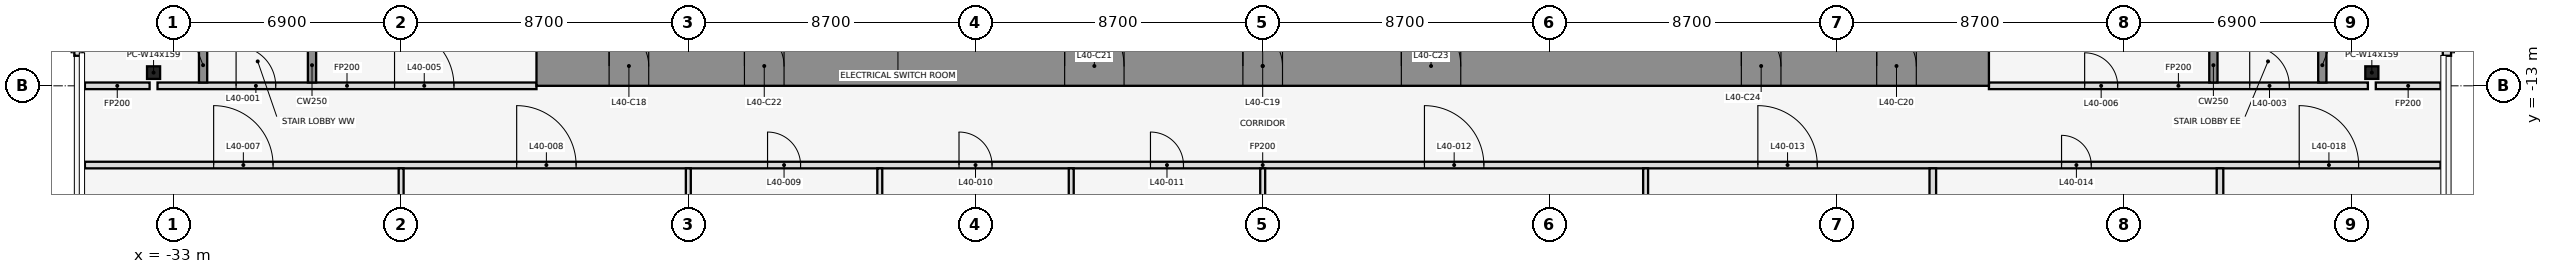
"""IFC4 building model, lengths in metres.
Left out: names, types, materials, properties, quantities, classifications, styles, units other than length and angle.
Written with IfcOpenShell. Run it as: python <this file> out.ifc"""

import sys

from ifc_helpers import new_model, si_unit, direction, frame, frame_2d, origin, origin_2d, place, context, subcontext, project, spatial, rectangle, i_section, extrude, element, fill, save


model = new_model("IFC4")
c1 = context("Model", 3, precision=1e-05, world=origin(), true_north=direction((0.0, 1.0)))
c2 = subcontext(c1, "Body", "Model", "MODEL_VIEW")
j1 = project(units=[si_unit("LENGTHUNIT", "METRE"), si_unit("PLANEANGLEUNIT", "RADIAN")], contexts=[c1])
p1 = place(None, origin())
s1 = spatial("IfcSite", under=j1, at=p1, CompositionType="ELEMENT")
p2 = place(p1, origin())
s2 = spatial("IfcBuilding", under=s1, at=p2, CompositionType="ELEMENT")
p3 = place(p2, frame((0.0, 0.0, 181.4)))
s3 = spatial("IfcBuildingStorey", under=s2, at=p3, CompositionType="ELEMENT", Elevation=181.4)
for number, where, z_axis, x_axis in (
    (1, (-33.6, -12.6, 0.0), (0.0, 0.0, 1.0), (1.0, 0.0, 0.0)),
    (2, (33.6, -12.6, 0.0), (0.0, 0.0, 1.0), (1.0, 0.0, 0.0)),
):
    element("IfcColumn", number, at=place(p3, frame(where, z_axis=z_axis, x_axis=x_axis)), inside=s3, PredefinedType="COLUMN", context=c2, shape_type="SweptSolid", body=[
        extrude(i_section(OverallWidth=0.396, OverallDepth=0.381, WebThickness=0.019, FlangeThickness=0.03, at=origin_2d()), origin(), (0.0, 0.0, 1.0), 4.1),
    ])
for number, where, z_axis, x_axis in (
    (3, (-35.875, -3.0, 0.0), (0.0, 0.0, 1.0), (0.0, -1.0, 0.0)),
    (4, (35.875, -12.09, 0.0), (0.0, 0.0, 1.0), (0.0, 1.0, 0.0)),
):
    element("IfcWall", number, at=place(p3, frame(where, z_axis=z_axis, x_axis=x_axis)), inside=s3, PredefinedType="STANDARD", context=c2, shape_type="SweptSolid", body=[
        extrude(rectangle(XDim=9.09, YDim=0.25, at=frame_2d((4.545, 0.0))), origin(), (0.0, 0.0, 1.0), 3.9),
    ])
p4 = place(p3, frame((-35.68, -15.4, 0.0), z_axis=(0.0, 0.0, 1.0), x_axis=(1.0, 0.0, 0.0)))
e5 = element("IfcWall", 5, at=p4, inside=s3, PredefinedType="PARTITIONING", context=c2, shape_type="SweptSolid", body=[
    extrude(rectangle(XDim=71.36, YDim=0.2, at=frame_2d((35.68, 0.0))), origin(), (0.0, 0.0, 1.0), 2.79),
])
p5 = place(p4, frame((3.9, 0.0, 0.0)))
e6 = element("IfcOpeningElement", 6, at=p5, cuts=e5, PredefinedType="OPENING", context=c2, shape_type="SweptSolid", body=[
    extrude(rectangle(XDim=1.8, YDim=2.1, at=frame_2d((0.9, 1.05))), frame((0.0, 0.112, 0.0), z_axis=(0.0, -1.0, 0.0), x_axis=(1.0, 0.0, 0.0)), (0.0, 0.0, 1.0), 0.224),
])
p6 = place(p4, frame((13.08, 0.0, 0.0)))
e7 = element("IfcOpeningElement", 7, at=p6, cuts=e5, PredefinedType="OPENING", context=c2, shape_type="SweptSolid", body=[
    extrude(rectangle(XDim=1.8, YDim=2.1, at=frame_2d((0.9, 1.05))), frame((0.0, 0.112, 0.0), z_axis=(0.0, -1.0, 0.0), x_axis=(1.0, 0.0, 0.0)), (0.0, 0.0, 1.0), 0.224),
])
p7 = place(p4, frame((20.68, 0.0, 0.0)))
e8 = element("IfcOpeningElement", 8, at=p7, cuts=e5, PredefinedType="OPENING", context=c2, shape_type="SweptSolid", body=[
    extrude(rectangle(XDim=1.0, YDim=2.1, at=frame_2d((0.5, 1.05))), frame((0.0, 0.112, 0.0), z_axis=(0.0, -1.0, 0.0), x_axis=(1.0, 0.0, 0.0)), (0.0, 0.0, 1.0), 0.224),
])
p8 = place(p4, frame((26.48, 0.0, 0.0)))
e9 = element("IfcOpeningElement", 9, at=p8, cuts=e5, PredefinedType="OPENING", context=c2, shape_type="SweptSolid", body=[
    extrude(rectangle(XDim=1.0, YDim=2.1, at=frame_2d((0.5, 1.05))), frame((0.0, 0.112, 0.0), z_axis=(0.0, -1.0, 0.0), x_axis=(1.0, 0.0, 0.0)), (0.0, 0.0, 1.0), 0.224),
])
p9 = place(p4, frame((32.28, 0.0, 0.0)))
e10 = element("IfcOpeningElement", 10, at=p9, cuts=e5, PredefinedType="OPENING", context=c2, shape_type="SweptSolid", body=[
    extrude(rectangle(XDim=1.0, YDim=2.1, at=frame_2d((0.5, 1.05))), frame((0.0, 0.112, 0.0), z_axis=(0.0, -1.0, 0.0), x_axis=(1.0, 0.0, 0.0)), (0.0, 0.0, 1.0), 0.224),
])
p10 = place(p4, frame((40.58, 0.0, 0.0)))
e11 = element("IfcOpeningElement", 11, at=p10, cuts=e5, PredefinedType="OPENING", context=c2, shape_type="SweptSolid", body=[
    extrude(rectangle(XDim=1.8, YDim=2.1, at=frame_2d((0.9, 1.05))), frame((0.0, 0.112, 0.0), z_axis=(0.0, -1.0, 0.0), x_axis=(1.0, 0.0, 0.0)), (0.0, 0.0, 1.0), 0.224),
])
p11 = place(p4, frame((50.68, 0.0, 0.0)))
e12 = element("IfcOpeningElement", 12, at=p11, cuts=e5, PredefinedType="OPENING", context=c2, shape_type="SweptSolid", body=[
    extrude(rectangle(XDim=1.8, YDim=2.1, at=frame_2d((0.9, 1.05))), frame((0.0, 0.112, 0.0), z_axis=(0.0, -1.0, 0.0), x_axis=(1.0, 0.0, 0.0)), (0.0, 0.0, 1.0), 0.224),
])
p12 = place(p4, frame((59.88, 0.0, 0.0)))
e13 = element("IfcOpeningElement", 13, at=p12, cuts=e5, PredefinedType="OPENING", context=c2, shape_type="SweptSolid", body=[
    extrude(rectangle(XDim=0.9, YDim=2.1, at=frame_2d((0.45, 1.05))), frame((0.0, 0.112, 0.0), z_axis=(0.0, -1.0, 0.0), x_axis=(1.0, 0.0, 0.0)), (0.0, 0.0, 1.0), 0.224),
])
p13 = place(p4, frame((67.08, 0.0, 0.0)))
e14 = element("IfcOpeningElement", 14, at=p13, cuts=e5, PredefinedType="OPENING", context=c2, shape_type="SweptSolid", body=[
    extrude(rectangle(XDim=1.8, YDim=2.1, at=frame_2d((0.9, 1.05))), frame((0.0, 0.112, 0.0), z_axis=(0.0, -1.0, 0.0), x_axis=(1.0, 0.0, 0.0)), (0.0, 0.0, 1.0), 0.224),
])
p14 = place(p3, frame((-35.68, -13.0, 0.0), z_axis=(0.0, 0.0, 1.0), x_axis=(1.0, 0.0, 0.0)))
e15 = element("IfcWall", 15, at=p14, inside=s3, PredefinedType="PARTITIONING", context=c2, shape_type="SweptSolid", body=[
    extrude(rectangle(XDim=1.96, YDim=0.2, at=frame_2d((0.98, 0.0))), origin(), (0.0, 0.0, 1.0), 2.79),
])
p15 = place(p3, frame((-33.48, -13.0, 0.0), z_axis=(0.0, 0.0, 1.0), x_axis=(1.0, 0.0, 0.0)))
e16 = element("IfcWall", 16, at=p15, inside=s3, PredefinedType="PARTITIONING", context=c2, shape_type="SweptSolid", body=[
    extrude(rectangle(XDim=11.48, YDim=0.2, at=frame_2d((5.74, 0.0))), origin(), (0.0, 0.0, 1.0), 2.79),
])
p16 = place(p15, frame((2.38, 0.0, 0.0)))
e17 = element("IfcOpeningElement", 17, at=p16, cuts=e16, PredefinedType="OPENING", context=c2, shape_type="SweptSolid", body=[
    extrude(rectangle(XDim=1.2, YDim=2.1, at=frame_2d((0.6, 1.05))), frame((0.0, 0.112, 0.0), z_axis=(0.0, -1.0, 0.0), x_axis=(1.0, 0.0, 0.0)), (0.0, 0.0, 1.0), 0.224),
])
p17 = place(p15, frame((7.18, 0.0, 0.0)))
e18 = element("IfcOpeningElement", 18, at=p17, cuts=e16, PredefinedType="OPENING", context=c2, shape_type="SweptSolid", body=[
    extrude(rectangle(XDim=1.8, YDim=2.1, at=frame_2d((0.9, 1.05))), frame((0.0, 0.112, 0.0), z_axis=(0.0, -1.0, 0.0), x_axis=(1.0, 0.0, 0.0)), (0.0, 0.0, 1.0), 0.224),
])
p18 = place(p3, frame((22.0, -13.0, 0.0), z_axis=(0.0, 0.0, 1.0), x_axis=(1.0, 0.0, 0.0)))
e19 = element("IfcWall", 19, at=p18, inside=s3, PredefinedType="PARTITIONING", context=c2, shape_type="SweptSolid", body=[
    extrude(rectangle(XDim=11.48, YDim=0.2, at=frame_2d((5.74, 0.0))), origin(), (0.0, 0.0, 1.0), 2.79),
])
p19 = place(p18, frame((7.9, 0.0, 0.0)))
e20 = element("IfcOpeningElement", 20, at=p19, cuts=e19, PredefinedType="OPENING", context=c2, shape_type="SweptSolid", body=[
    extrude(rectangle(XDim=1.2, YDim=2.1, at=frame_2d((0.6, 1.05))), frame((0.0, 0.112, 0.0), z_axis=(0.0, -1.0, 0.0), x_axis=(1.0, 0.0, 0.0)), (0.0, 0.0, 1.0), 0.224),
])
p20 = place(p18, frame((2.9, 0.0, 0.0)))
e21 = element("IfcOpeningElement", 21, at=p20, cuts=e19, PredefinedType="OPENING", context=c2, shape_type="SweptSolid", body=[
    extrude(rectangle(XDim=1.0, YDim=2.1, at=frame_2d((0.5, 1.05))), frame((0.0, 0.112, 0.0), z_axis=(0.0, -1.0, 0.0), x_axis=(1.0, 0.0, 0.0)), (0.0, 0.0, 1.0), 0.224),
])
p21 = place(p3, frame((33.72, -13.0, 0.0), z_axis=(0.0, 0.0, 1.0), x_axis=(1.0, 0.0, 0.0)))
e22 = element("IfcWall", 22, at=p21, inside=s3, PredefinedType="PARTITIONING", context=c2, shape_type="SweptSolid", body=[
    extrude(rectangle(XDim=1.96, YDim=0.2, at=frame_2d((0.98, 0.0))), origin(), (0.0, 0.0, 1.0), 2.79),
])
for number, where, z_axis, x_axis in (
    (23, (-32.1, -12.9, 0.0), (0.0, 0.0, 1.0), (0.0, 1.0, 0.0)),
    (24, (-28.8, -12.9, 0.0), (0.0, 0.0, 1.0), (0.0, 1.0, 0.0)),
):
    element("IfcWall", number, at=place(p3, frame(where, z_axis=z_axis, x_axis=x_axis)), inside=s3, PredefinedType="SHEAR", context=c2, shape_type="SweptSolid", body=[
        extrude(rectangle(XDim=1.05, YDim=0.25, at=frame_2d((0.525, 0.0))), origin(), (0.0, 0.0, 1.0), 4.1),
    ])
p22 = place(p3, frame((-26.1, -33.49, 0.0), z_axis=(0.0, 0.0, 1.0), x_axis=(0.0, 1.0, 0.0)))
e25 = element("IfcWall", 25, at=p22, inside=s3, PredefinedType="PARTITIONING", context=c2, shape_type="SweptSolid", body=[
    extrude(rectangle(XDim=17.99, YDim=0.15, at=frame_2d((8.995, 0.0))), origin(), (0.0, 0.0, 1.0), 2.79),
])
p23 = place(p3, frame((-17.4, -30.816, 0.0), z_axis=(0.0, 0.0, 1.0), x_axis=(0.0, 1.0, 0.0)))
e26 = element("IfcWall", 26, at=p23, inside=s3, PredefinedType="PARTITIONING", context=c2, shape_type="SweptSolid", body=[
    extrude(rectangle(XDim=15.316, YDim=0.15, at=frame_2d((7.658, 0.0))), origin(), (0.0, 0.0, 1.0), 2.79),
])
p24 = place(p3, frame((-11.6, -33.391, 0.0), z_axis=(0.0, 0.0, 1.0), x_axis=(0.0, 1.0, 0.0)))
e27 = element("IfcWall", 27, at=p24, inside=s3, PredefinedType="PARTITIONING", context=c2, shape_type="SweptSolid", body=[
    extrude(rectangle(XDim=17.891, YDim=0.15, at=frame_2d((8.946, 0.0))), origin(), (0.0, 0.0, 1.0), 2.79),
])
p25 = place(p3, frame((-5.8, -36.21, 0.0), z_axis=(0.0, 0.0, 1.0), x_axis=(0.0, 1.0, 0.0)))
e28 = element("IfcWall", 28, at=p25, inside=s3, PredefinedType="PARTITIONING", context=c2, shape_type="SweptSolid", body=[
    extrude(rectangle(XDim=20.71, YDim=0.15, at=frame_2d((10.355, 0.0))), origin(), (0.0, 0.0, 1.0), 2.79),
])
p26 = place(p3, frame((0.0, -33.45, 0.0), z_axis=(0.0, 0.0, 1.0), x_axis=(0.0, 1.0, 0.0)))
e29 = element("IfcWall", 29, at=p26, inside=s3, PredefinedType="PARTITIONING", context=c2, shape_type="SweptSolid", body=[
    extrude(rectangle(XDim=17.95, YDim=0.15, at=frame_2d((8.975, 0.0))), origin(), (0.0, 0.0, 1.0), 2.79),
])
p27 = place(p3, frame((11.6, -33.391, 0.0), z_axis=(0.0, 0.0, 1.0), x_axis=(0.0, 1.0, 0.0)))
e30 = element("IfcWall", 30, at=p27, inside=s3, PredefinedType="PARTITIONING", context=c2, shape_type="SweptSolid", body=[
    extrude(rectangle(XDim=17.891, YDim=0.15, at=frame_2d((8.946, 0.0))), origin(), (0.0, 0.0, 1.0), 2.79),
])
p28 = place(p3, frame((20.3, -33.49, 0.0), z_axis=(0.0, 0.0, 1.0), x_axis=(0.0, 1.0, 0.0)))
e31 = element("IfcWall", 31, at=p28, inside=s3, PredefinedType="PARTITIONING", context=c2, shape_type="SweptSolid", body=[
    extrude(rectangle(XDim=17.99, YDim=0.2, at=frame_2d((8.995, 0.0))), origin(), (0.0, 0.0, 1.0), 2.79),
])
p29 = place(p3, frame((28.8, -12.9, 0.0), z_axis=(0.0, 0.0, 1.0), x_axis=(0.0, 1.0, 0.0)))
e32 = element("IfcWall", 32, at=p29, inside=s3, PredefinedType="SHEAR", context=c2, shape_type="SweptSolid", body=[
    extrude(rectangle(XDim=1.05, YDim=0.25, at=frame_2d((0.525, 0.0))), origin(), (0.0, 0.0, 1.0), 4.1),
])
p30 = place(p3, frame((29.0, -21.725, 0.0), z_axis=(0.0, 0.0, 1.0), x_axis=(0.0, 1.0, 0.0)))
e33 = element("IfcWall", 33, at=p30, inside=s3, PredefinedType="PARTITIONING", context=c2, shape_type="SweptSolid", body=[
    extrude(rectangle(XDim=6.225, YDim=0.2, at=frame_2d((3.113, 0.0))), origin(), (0.0, 0.0, 1.0), 2.79),
])
p31 = place(p3, frame((32.1, -12.9, 0.0), z_axis=(0.0, 0.0, 1.0), x_axis=(0.0, 1.0, 0.0)))
e34 = element("IfcWall", 34, at=p31, inside=s3, PredefinedType="SHEAR", context=c2, shape_type="SweptSolid", body=[
    extrude(rectangle(XDim=1.05, YDim=0.25, at=frame_2d((0.525, 0.0))), origin(), (0.0, 0.0, 1.0), 4.1),
])
p32 = place(p3, frame((-22.0, -12.4, 0.0), z_axis=(0.0, 0.0, 1.0), x_axis=(1.0, 0.0, 0.0)))
e35 = element("IfcWall", 35, at=p32, inside=s3, PredefinedType="SHEAR", context=c2, shape_type="SweptSolid", body=[
    extrude(rectangle(XDim=44.0, YDim=1.2, at=frame_2d((22.0, 0.0))), origin(), (0.0, 0.0, 1.0), 4.1),
])
p33 = place(p32, frame((2.2, 0.0, 0.0)))
e36 = element("IfcOpeningElement", 36, at=p33, cuts=e35, PredefinedType="OPENING", context=c2, shape_type="SweptSolid", body=[
    extrude(rectangle(XDim=1.2, YDim=2.1, at=frame_2d((0.6, 1.05))), frame((0.0, 0.612, 0.0), z_axis=(0.0, -1.0, 0.0), x_axis=(1.0, 0.0, 0.0)), (0.0, 0.0, 1.0), 1.224),
])
p34 = place(p32, frame((21.4, 0.0, 0.0)))
e37 = element("IfcOpeningElement", 37, at=p34, cuts=e35, PredefinedType="OPENING", context=c2, shape_type="SweptSolid", body=[
    extrude(rectangle(XDim=1.2, YDim=2.1, at=frame_2d((0.6, 1.05))), frame((0.0, 0.612, 0.0), z_axis=(0.0, -1.0, 0.0), x_axis=(1.0, 0.0, 0.0)), (0.0, 0.0, 1.0), 1.224),
])
p35 = place(p32, frame((40.6, 0.0, 0.0)))
e38 = element("IfcOpeningElement", 38, at=p35, cuts=e35, PredefinedType="OPENING", context=c2, shape_type="SweptSolid", body=[
    extrude(rectangle(XDim=1.2, YDim=2.1, at=frame_2d((0.6, 1.05))), frame((0.0, 0.612, 0.0), z_axis=(0.0, -1.0, 0.0), x_axis=(1.0, 0.0, 0.0)), (0.0, 0.0, 1.0), 1.224),
])
p36 = place(p32, frame((16.0, 0.0, 0.0)))
e39 = element("IfcOpeningElement", 39, at=p36, cuts=e35, PredefinedType="OPENING", context=c2, shape_type="SweptSolid", body=[
    extrude(rectangle(XDim=1.8, YDim=2.1, at=frame_2d((0.9, 1.05))), frame((0.0, 0.612, 0.0), z_axis=(0.0, -1.0, 0.0), x_axis=(1.0, 0.0, 0.0)), (0.0, 0.0, 1.0), 1.224),
])
p37 = place(p32, frame((6.3, 0.0, 0.0)))
e40 = element("IfcOpeningElement", 40, at=p37, cuts=e35, PredefinedType="OPENING", context=c2, shape_type="SweptSolid", body=[
    extrude(rectangle(XDim=1.2, YDim=2.1, at=frame_2d((0.6, 1.05))), frame((0.0, 0.612, 0.0), z_axis=(0.0, -1.0, 0.0), x_axis=(1.0, 0.0, 0.0)), (0.0, 0.0, 1.0), 1.224),
])
p38 = place(p32, frame((26.2, 0.0, 0.0)))
e41 = element("IfcOpeningElement", 41, at=p38, cuts=e35, PredefinedType="OPENING", context=c2, shape_type="SweptSolid", body=[
    extrude(rectangle(XDim=1.8, YDim=2.1, at=frame_2d((0.9, 1.05))), frame((0.0, 0.612, 0.0), z_axis=(0.0, -1.0, 0.0), x_axis=(1.0, 0.0, 0.0)), (0.0, 0.0, 1.0), 1.224),
])
p39 = place(p32, frame((36.5, 0.0, 0.0)))
e42 = element("IfcOpeningElement", 42, at=p39, cuts=e35, PredefinedType="OPENING", context=c2, shape_type="SweptSolid", body=[
    extrude(rectangle(XDim=1.2, YDim=2.1, at=frame_2d((0.6, 1.05))), frame((0.0, 0.612, 0.0), z_axis=(0.0, -1.0, 0.0), x_axis=(1.0, 0.0, 0.0)), (0.0, 0.0, 1.0), 1.224),
])
p40 = place(p16, origin())
e43 = element("IfcDoor", 43, at=p40, inside=s3, OperationType="SINGLE_SWING_LEFT", PredefinedType="DOOR", context=c2, shape_type="SweptSolid", body=[
    extrude(rectangle(XDim=1.2, YDim=2.1, at=frame_2d((0.6, 1.05))), frame((0.0, 0.025, 0.0), z_axis=(0.0, -1.0, 0.0), x_axis=(1.0, 0.0, 0.0)), (0.0, 0.0, 1.0), 0.05),
])
fill(e17, e43)
p41 = place(p19, origin())
e44 = element("IfcDoor", 44, at=p41, inside=s3, OperationType="SINGLE_SWING_RIGHT", PredefinedType="DOOR", context=c2, shape_type="SweptSolid", body=[
    extrude(rectangle(XDim=1.2, YDim=2.1, at=frame_2d((0.6, 1.05))), frame((0.0, 0.025, 0.0), z_axis=(0.0, -1.0, 0.0), x_axis=(1.0, 0.0, 0.0)), (0.0, 0.0, 1.0), 0.05),
])
fill(e20, e44)
p42 = place(p17, origin())
e45 = element("IfcDoor", 45, at=p42, inside=s3, OperationType="SINGLE_SWING_LEFT", PredefinedType="DOOR", context=c2, shape_type="SweptSolid", body=[
    extrude(rectangle(XDim=1.8, YDim=2.1, at=frame_2d((0.9, 1.05))), frame((0.0, 0.025, 0.0), z_axis=(0.0, -1.0, 0.0), x_axis=(1.0, 0.0, 0.0)), (0.0, 0.0, 1.0), 0.05),
])
fill(e18, e45)
p43 = place(p20, origin())
e46 = element("IfcDoor", 46, at=p43, inside=s3, OperationType="SINGLE_SWING_RIGHT", PredefinedType="DOOR", context=c2, shape_type="SweptSolid", body=[
    extrude(rectangle(XDim=1.0, YDim=2.1, at=frame_2d((0.5, 1.05))), frame((0.0, 0.025, 0.0), z_axis=(0.0, -1.0, 0.0), x_axis=(1.0, 0.0, 0.0)), (0.0, 0.0, 1.0), 0.05),
])
fill(e21, e46)
p44 = place(p5, origin())
e47 = element("IfcDoor", 47, at=p44, inside=s3, OperationType="SINGLE_SWING_LEFT", PredefinedType="DOOR", context=c2, shape_type="SweptSolid", body=[
    extrude(rectangle(XDim=1.8, YDim=2.1, at=frame_2d((0.9, 1.05))), frame((0.0, 0.025, 0.0), z_axis=(0.0, -1.0, 0.0), x_axis=(1.0, 0.0, 0.0)), (0.0, 0.0, 1.0), 0.05),
])
fill(e6, e47)
p45 = place(p6, origin())
e48 = element("IfcDoor", 48, at=p45, inside=s3, OperationType="SINGLE_SWING_LEFT", PredefinedType="DOOR", context=c2, shape_type="SweptSolid", body=[
    extrude(rectangle(XDim=1.8, YDim=2.1, at=frame_2d((0.9, 1.05))), frame((0.0, 0.025, 0.0), z_axis=(0.0, -1.0, 0.0), x_axis=(1.0, 0.0, 0.0)), (0.0, 0.0, 1.0), 0.05),
])
fill(e7, e48)
p46 = place(p7, frame((1.0, 0.0, 0.0), z_axis=(0.0, 0.0, 1.0), x_axis=(-1.0, 0.0, 0.0)))
e49 = element("IfcDoor", 49, at=p46, inside=s3, OperationType="SINGLE_SWING_RIGHT", PredefinedType="DOOR", context=c2, shape_type="SweptSolid", body=[
    extrude(rectangle(XDim=1.0, YDim=2.1, at=frame_2d((0.5, 1.05))), frame((0.0, 0.025, 0.0), z_axis=(0.0, -1.0, 0.0), x_axis=(1.0, 0.0, 0.0)), (0.0, 0.0, 1.0), 0.05),
])
fill(e8, e49)
p47 = place(p8, frame((1.0, 0.0, 0.0), z_axis=(0.0, 0.0, 1.0), x_axis=(-1.0, 0.0, 0.0)))
e50 = element("IfcDoor", 50, at=p47, inside=s3, OperationType="SINGLE_SWING_LEFT", PredefinedType="DOOR", context=c2, shape_type="SweptSolid", body=[
    extrude(rectangle(XDim=1.0, YDim=2.1, at=frame_2d((0.5, 1.05))), frame((0.0, 0.025, 0.0), z_axis=(0.0, -1.0, 0.0), x_axis=(1.0, 0.0, 0.0)), (0.0, 0.0, 1.0), 0.05),
])
fill(e9, e50)
p48 = place(p9, frame((1.0, 0.0, 0.0), z_axis=(0.0, 0.0, 1.0), x_axis=(-1.0, 0.0, 0.0)))
e51 = element("IfcDoor", 51, at=p48, inside=s3, OperationType="SINGLE_SWING_RIGHT", PredefinedType="DOOR", context=c2, shape_type="SweptSolid", body=[
    extrude(rectangle(XDim=1.0, YDim=2.1, at=frame_2d((0.5, 1.05))), frame((0.0, 0.025, 0.0), z_axis=(0.0, -1.0, 0.0), x_axis=(1.0, 0.0, 0.0)), (0.0, 0.0, 1.0), 0.05),
])
fill(e10, e51)
p49 = place(p10, origin())
e52 = element("IfcDoor", 52, at=p49, inside=s3, OperationType="SINGLE_SWING_LEFT", PredefinedType="DOOR", context=c2, shape_type="SweptSolid", body=[
    extrude(rectangle(XDim=1.8, YDim=2.1, at=frame_2d((0.9, 1.05))), frame((0.0, 0.025, 0.0), z_axis=(0.0, -1.0, 0.0), x_axis=(1.0, 0.0, 0.0)), (0.0, 0.0, 1.0), 0.05),
])
fill(e11, e52)
p50 = place(p11, origin())
e53 = element("IfcDoor", 53, at=p50, inside=s3, OperationType="SINGLE_SWING_LEFT", PredefinedType="DOOR", context=c2, shape_type="SweptSolid", body=[
    extrude(rectangle(XDim=1.8, YDim=2.1, at=frame_2d((0.9, 1.05))), frame((0.0, 0.025, 0.0), z_axis=(0.0, -1.0, 0.0), x_axis=(1.0, 0.0, 0.0)), (0.0, 0.0, 1.0), 0.05),
])
fill(e12, e53)
p51 = place(p12, frame((0.9, 0.0, 0.0), z_axis=(0.0, 0.0, 1.0), x_axis=(-1.0, 0.0, 0.0)))
e54 = element("IfcDoor", 54, at=p51, inside=s3, OperationType="SINGLE_SWING_RIGHT", PredefinedType="DOOR", context=c2, shape_type="SweptSolid", body=[
    extrude(rectangle(XDim=0.9, YDim=2.1, at=frame_2d((0.45, 1.05))), frame((0.0, 0.025, 0.0), z_axis=(0.0, -1.0, 0.0), x_axis=(1.0, 0.0, 0.0)), (0.0, 0.0, 1.0), 0.05),
])
fill(e13, e54)
p52 = place(p13, origin())
e55 = element("IfcDoor", 55, at=p52, inside=s3, OperationType="SINGLE_SWING_LEFT", PredefinedType="DOOR", context=c2, shape_type="SweptSolid", body=[
    extrude(rectangle(XDim=1.8, YDim=2.1, at=frame_2d((0.9, 1.05))), frame((0.0, 0.025, 0.0), z_axis=(0.0, -1.0, 0.0), x_axis=(1.0, 0.0, 0.0)), (0.0, 0.0, 1.0), 0.05),
])
fill(e14, e55)
p53 = place(p33, frame((1.2, 0.0, 0.0), z_axis=(0.0, 0.0, 1.0), x_axis=(-1.0, 0.0, 0.0)))
e56 = element("IfcDoor", 56, at=p53, inside=s3, OperationType="SINGLE_SWING_RIGHT", PredefinedType="DOOR", context=c2, shape_type="SweptSolid", body=[
    extrude(rectangle(XDim=1.2, YDim=2.1, at=frame_2d((0.6, 1.05))), frame((0.0, 0.025, 0.0), z_axis=(0.0, -1.0, 0.0), x_axis=(1.0, 0.0, 0.0)), (0.0, 0.0, 1.0), 0.05),
])
fill(e36, e56)
p54 = place(p34, frame((1.2, 0.0, 0.0), z_axis=(0.0, 0.0, 1.0), x_axis=(-1.0, 0.0, 0.0)))
e57 = element("IfcDoor", 57, at=p54, inside=s3, OperationType="SINGLE_SWING_RIGHT", PredefinedType="DOOR", context=c2, shape_type="SweptSolid", body=[
    extrude(rectangle(XDim=1.2, YDim=2.1, at=frame_2d((0.6, 1.05))), frame((0.0, 0.025, 0.0), z_axis=(0.0, -1.0, 0.0), x_axis=(1.0, 0.0, 0.0)), (0.0, 0.0, 1.0), 0.05),
])
fill(e37, e57)
p55 = place(p35, frame((1.2, 0.0, 0.0), z_axis=(0.0, 0.0, 1.0), x_axis=(-1.0, 0.0, 0.0)))
e58 = element("IfcDoor", 58, at=p55, inside=s3, OperationType="SINGLE_SWING_RIGHT", PredefinedType="DOOR", context=c2, shape_type="SweptSolid", body=[
    extrude(rectangle(XDim=1.2, YDim=2.1, at=frame_2d((0.6, 1.05))), frame((0.0, 0.025, 0.0), z_axis=(0.0, -1.0, 0.0), x_axis=(1.0, 0.0, 0.0)), (0.0, 0.0, 1.0), 0.05),
])
fill(e38, e58)
p56 = place(p36, origin())
e59 = element("IfcDoor", 59, at=p56, inside=s3, OperationType="SINGLE_SWING_LEFT", PredefinedType="DOOR", context=c2, shape_type="SweptSolid", body=[
    extrude(rectangle(XDim=1.8, YDim=2.1, at=frame_2d((0.9, 1.05))), frame((0.0, 0.025, 0.0), z_axis=(0.0, -1.0, 0.0), x_axis=(1.0, 0.0, 0.0)), (0.0, 0.0, 1.0), 0.05),
])
fill(e39, e59)
p57 = place(p37, frame((1.2, 0.0, 0.0), z_axis=(0.0, 0.0, 1.0), x_axis=(-1.0, 0.0, 0.0)))
e60 = element("IfcDoor", 60, at=p57, inside=s3, OperationType="SINGLE_SWING_RIGHT", PredefinedType="DOOR", context=c2, shape_type="SweptSolid", body=[
    extrude(rectangle(XDim=1.2, YDim=2.1, at=frame_2d((0.6, 1.05))), frame((0.0, 0.025, 0.0), z_axis=(0.0, -1.0, 0.0), x_axis=(1.0, 0.0, 0.0)), (0.0, 0.0, 1.0), 0.05),
])
fill(e40, e60)
p58 = place(p38, origin())
e61 = element("IfcDoor", 61, at=p58, inside=s3, OperationType="SINGLE_SWING_LEFT", PredefinedType="DOOR", context=c2, shape_type="SweptSolid", body=[
    extrude(rectangle(XDim=1.8, YDim=2.1, at=frame_2d((0.9, 1.05))), frame((0.0, 0.025, 0.0), z_axis=(0.0, -1.0, 0.0), x_axis=(1.0, 0.0, 0.0)), (0.0, 0.0, 1.0), 0.05),
])
fill(e41, e61)
p59 = place(p39, frame((1.2, 0.0, 0.0), z_axis=(0.0, 0.0, 1.0), x_axis=(-1.0, 0.0, 0.0)))
e62 = element("IfcDoor", 62, at=p59, inside=s3, OperationType="SINGLE_SWING_RIGHT", PredefinedType="DOOR", context=c2, shape_type="SweptSolid", body=[
    extrude(rectangle(XDim=1.2, YDim=2.1, at=frame_2d((0.6, 1.05))), frame((0.0, 0.025, 0.0), z_axis=(0.0, -1.0, 0.0), x_axis=(1.0, 0.0, 0.0)), (0.0, 0.0, 1.0), 0.05),
])
fill(e42, e62)
save(model, sys.argv[1])
